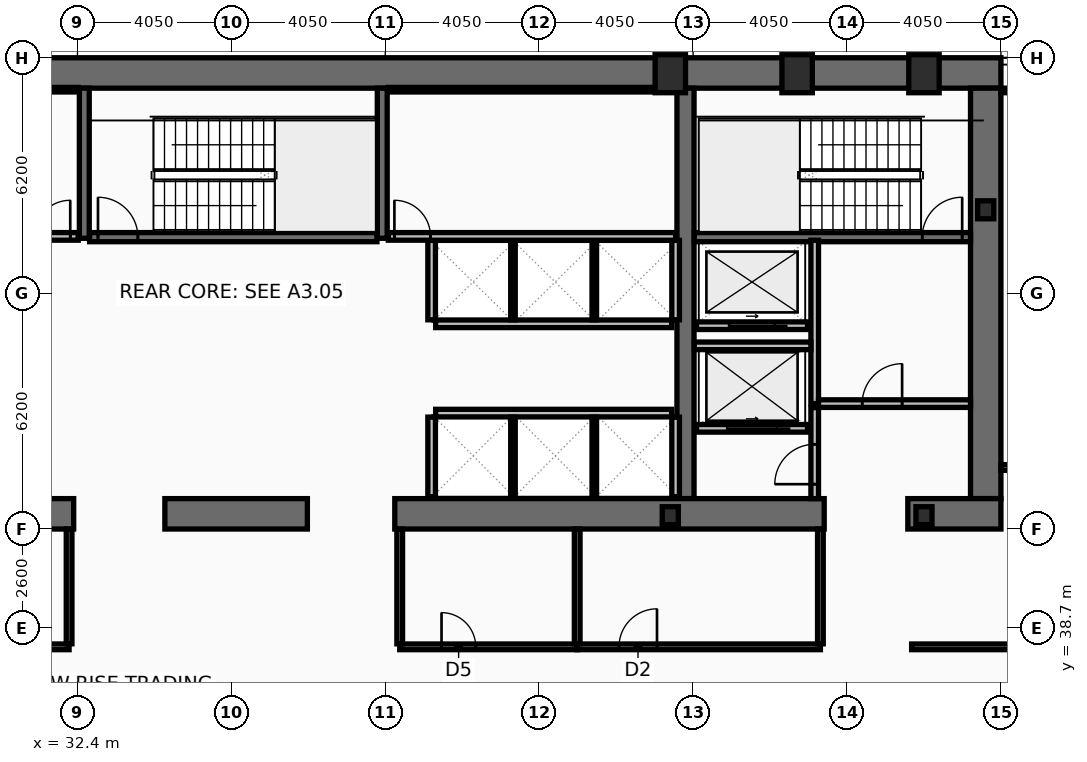
"""IFC4 building model, lengths in metres.
Left out: names, types, materials, properties, quantities, classifications, styles, units other than length and angle.
Written with IfcOpenShell. Run it as: python <this file> out.ifc"""

import sys

from ifc_helpers import new_model, si_unit, direction, frame, frame_2d, origin, origin_2d, place, context, subcontext, project, spatial, rectangle, hollow_rectangle, i_section, extrude, element, fill, save


model = new_model("IFC4")
c1 = context("Model", 3, precision=1e-05, world=origin(), true_north=direction((0.0, 1.0)))
c2 = subcontext(c1, "Body", "Model", "MODEL_VIEW")
j1 = project(units=[si_unit("LENGTHUNIT", "METRE"), si_unit("PLANEANGLEUNIT", "RADIAN")], contexts=[c1])
p1 = place(None, origin())
s1 = spatial("IfcSite", under=j1, at=p1, CompositionType="ELEMENT")
p2 = place(p1, origin())
s2 = spatial("IfcBuilding", under=s1, at=p2, CompositionType="ELEMENT")
p3 = place(p2, frame((0.0, 0.0, 77.8)))
s3 = spatial("IfcBuildingStorey", under=s2, at=p3, CompositionType="ELEMENT", Elevation=77.8)
p4 = place(p3, frame((16.2, 53.3, 0.0), z_axis=(0.0, 0.0, 1.0), x_axis=(1.0, 0.0, 0.0)))
e1 = element("IfcWall", 1, at=p4, inside=s3, PredefinedType="SHEAR", context=c2, shape_type="SweptSolid", body=[
    extrude(rectangle(XDim=40.5, YDim=0.8, at=frame_2d((20.25, 0.0))), origin(), (0.0, 0.0, 1.0), 3.82),
])
p5 = place(p3, frame((56.3, 52.9, 0.0), z_axis=(0.0, 0.0, 1.0), x_axis=(0.0, -1.0, 0.0)))
e2 = element("IfcWall", 2, at=p5, inside=s3, PredefinedType="SHEAR", context=c2, shape_type="SweptSolid", body=[
    extrude(rectangle(XDim=10.8, YDim=0.8, at=frame_2d((5.4, 0.0))), origin(), (0.0, 0.0, 1.0), 3.82),
])
p6 = place(p3, frame((48.4, 42.1, 0.0), z_axis=(0.0, 0.0, 1.0), x_axis=(0.0, 1.0, 0.0)))
e3 = element("IfcWall", 3, at=p6, inside=s3, PredefinedType="SHEAR", context=c2, shape_type="SweptSolid", body=[
    extrude(rectangle(XDim=10.8, YDim=0.45, at=frame_2d((5.4, 0.0))), origin(), (0.0, 0.0, 1.0), 3.82),
])
p7 = place(p3, frame((32.3, 41.7, 0.0), z_axis=(0.0, 0.0, 1.0), x_axis=(-1.0, 0.0, 0.0)))
e4 = element("IfcWall", 4, at=p7, inside=s3, PredefinedType="SHEAR", context=c2, shape_type="SweptSolid", body=[
    extrude(rectangle(XDim=11.45, YDim=0.8, at=frame_2d((5.725, 0.0))), origin(), (0.0, 0.0, 1.0), 3.82),
])
p8 = place(p3, frame((38.45, 41.7, 0.0), z_axis=(0.0, 0.0, 1.0), x_axis=(-1.0, 0.0, 0.0)))
e5 = element("IfcWall", 5, at=p8, inside=s3, PredefinedType="SHEAR", context=c2, shape_type="SweptSolid", body=[
    extrude(rectangle(XDim=3.75, YDim=0.8, at=frame_2d((1.875, 0.0))), origin(), (0.0, 0.0, 1.0), 3.82),
])
p9 = place(p3, frame((52.05, 41.7, 0.0), z_axis=(0.0, 0.0, 1.0), x_axis=(-1.0, 0.0, 0.0)))
e6 = element("IfcWall", 6, at=p9, inside=s3, PredefinedType="SHEAR", context=c2, shape_type="SweptSolid", body=[
    extrude(rectangle(XDim=11.3, YDim=0.8, at=frame_2d((5.65, 0.0))), origin(), (0.0, 0.0, 1.0), 3.82),
])
p10 = place(p3, frame((56.7, 41.7, 0.0), z_axis=(0.0, 0.0, 1.0), x_axis=(-1.0, 0.0, 0.0)))
e7 = element("IfcWall", 7, at=p10, inside=s3, PredefinedType="SHEAR", context=c2, shape_type="SweptSolid", body=[
    extrude(rectangle(XDim=2.45, YDim=0.8, at=frame_2d((1.225, 0.0))), origin(), (0.0, 0.0, 1.0), 3.82),
])
for number, where, z_axis, x_axis in (
    (8, (32.58, 48.95, 0.0), (0.0, 0.0, 1.0), (0.0, 1.0, 0.0)),
    (9, (40.42, 48.95, 0.0), (0.0, 0.0, 1.0), (0.0, 1.0, 0.0)),
):
    element("IfcWall", number, at=place(p3, frame(where, z_axis=z_axis, x_axis=x_axis)), inside=s3, PredefinedType="SHEAR", context=c2, shape_type="SweptSolid", body=[
        extrude(rectangle(XDim=3.95, YDim=0.26, at=frame_2d((1.975, 0.0))), origin(), (0.0, 0.0, 1.0), 3.82),
    ])
p11 = place(p3, frame((48.63, 48.98, 0.0), z_axis=(0.0, 0.0, 1.0), x_axis=(1.0, 0.0, 0.0)))
e10 = element("IfcWall", 10, at=p11, inside=s3, PredefinedType="SHEAR", context=c2, shape_type="SweptSolid", body=[
    extrude(rectangle(XDim=7.27, YDim=0.24, at=frame_2d((3.635, 0.0))), origin(), (0.0, 0.0, 1.0), 3.82),
])
p12 = place(p11, frame((6.0, 0.0, 0.0)))
e11 = element("IfcOpeningElement", 11, at=p12, cuts=e10, PredefinedType="OPENING", context=c2, shape_type="SweptSolid", body=[
    extrude(rectangle(XDim=1.05, YDim=2.15, at=frame_2d((0.525, 1.075))), frame((0.0, 0.13, 0.0), z_axis=(0.0, -1.0, 0.0), x_axis=(1.0, 0.0, 0.0)), (0.0, 0.0, 1.0), 0.26),
])
p13 = place(p3, frame((32.72, 48.98, 0.0), z_axis=(0.0, 0.0, 1.0), x_axis=(1.0, 0.0, 0.0)))
e12 = element("IfcWall", 12, at=p13, inside=s3, PredefinedType="SHEAR", context=c2, shape_type="SweptSolid", body=[
    extrude(rectangle(XDim=7.56, YDim=0.24, at=frame_2d((3.78, 0.0))), origin(), (0.0, 0.0, 1.0), 3.82),
])
p14 = place(p13, frame((0.22, 0.0, 0.0)))
e13 = element("IfcOpeningElement", 13, at=p14, cuts=e12, PredefinedType="OPENING", context=c2, shape_type="SweptSolid", body=[
    extrude(rectangle(XDim=1.05, YDim=2.15, at=frame_2d((0.525, 1.075))), frame((0.0, 0.13, 0.0), z_axis=(0.0, -1.0, 0.0), x_axis=(1.0, 0.0, 0.0)), (0.0, 0.0, 1.0), 0.26),
])
for number, where, z_axis, x_axis in (
    (14, (48.0, 53.28, 0.0), (0.0, 0.0, 1.0), (1.0, 0.0, 0.0)),
    (15, (51.337, 53.28, 0.0), (0.0, 0.0, 1.0), (1.0, 0.0, 0.0)),
    (16, (54.675, 53.28, 0.0), (0.0, 0.0, 1.0), (1.0, 0.0, 0.0)),
):
    element("IfcColumn", number, at=place(p3, frame(where, z_axis=z_axis, x_axis=x_axis)), inside=s3, PredefinedType="COLUMN", context=c2, shape_type="SweptSolid", body=[
        extrude(hollow_rectangle(XDim=0.8, YDim=1.0, WallThickness=0.055, at=origin_2d()), origin(), (0.0, 0.0, 1.0), 4.0),
    ])
for number, where, z_axis, x_axis in (
    (17, (56.3, 49.7, 0.0), (0.0, 0.0, 1.0), (1.0, 0.0, 0.0)),
    (18, (48.0, 41.65, 0.0), (0.0, 0.0, 1.0), (1.0, 0.0, 0.0)),
    (19, (54.675, 41.65, 0.0), (0.0, 0.0, 1.0), (1.0, 0.0, 0.0)),
):
    element("IfcColumn", number, at=place(p3, frame(where, z_axis=z_axis, x_axis=x_axis)), inside=s3, PredefinedType="COLUMN", context=c2, shape_type="SweptSolid", body=[
        extrude(i_section(OverallWidth=0.424, OverallDepth=0.474, WebThickness=0.048, FlangeThickness=0.077, at=origin_2d()), origin(), (0.0, 0.0, 1.0), 4.0),
    ])
p15 = place(p3, frame((51.61, 43.95, 0.0), z_axis=(0.0, 0.0, 1.0), x_axis=(-1.0, 0.0, 0.0)))
e20 = element("IfcWall", 20, at=p15, inside=s3, PredefinedType="PARTITIONING", context=c2, shape_type="SweptSolid", body=[
    extrude(rectangle(XDim=2.92, YDim=0.2, at=frame_2d((1.46, 0.0))), origin(), (0.0, 0.0, 1.0), 3.82),
])
p16 = place(p15, frame((0.81, 0.0, 0.0)))
e21 = element("IfcOpeningElement", 21, at=p16, cuts=e20, PredefinedType="OPENING", context=c2, shape_type="SweptSolid", body=[
    extrude(rectangle(XDim=1.3, YDim=2.18, at=frame_2d((0.65, 1.09))), frame((0.0, 0.11, 0.0), z_axis=(0.0, -1.0, 0.0), x_axis=(1.0, 0.0, 0.0)), (0.0, 0.0, 1.0), 0.22),
])
p17 = place(p3, frame((51.61, 46.65, 0.0), z_axis=(0.0, 0.0, 1.0), x_axis=(-1.0, 0.0, 0.0)))
e22 = element("IfcWall", 22, at=p17, inside=s3, PredefinedType="PARTITIONING", context=c2, shape_type="SweptSolid", body=[
    extrude(rectangle(XDim=2.92, YDim=0.2, at=frame_2d((1.46, 0.0))), origin(), (0.0, 0.0, 1.0), 3.82),
])
p18 = place(p17, frame((0.86, 0.0, 0.0)))
e23 = element("IfcOpeningElement", 23, at=p18, cuts=e22, PredefinedType="OPENING", context=c2, shape_type="SweptSolid", body=[
    extrude(rectangle(XDim=1.2, YDim=2.18, at=frame_2d((0.6, 1.09))), frame((0.0, 0.11, 0.0), z_axis=(0.0, -1.0, 0.0), x_axis=(1.0, 0.0, 0.0)), (0.0, 0.0, 1.0), 0.22),
])
p19 = place(p3, frame((51.8, 44.6, 0.0), z_axis=(0.0, 0.0, 1.0), x_axis=(0.0, 1.0, 0.0)))
e24 = element("IfcWall", 24, at=p19, inside=s3, PredefinedType="PARTITIONING", context=c2, shape_type="SweptSolid", body=[
    extrude(rectangle(XDim=4.3, YDim=0.2, at=frame_2d((2.15, 0.0))), origin(), (0.0, 0.0, 1.0), 3.82),
])
p20 = place(p3, frame((51.9, 44.6, 0.0), z_axis=(0.0, 0.0, 1.0), x_axis=(1.0, 0.0, 0.0)))
e25 = element("IfcWall", 25, at=p20, inside=s3, PredefinedType="PARTITIONING", context=c2, shape_type="SweptSolid", body=[
    extrude(rectangle(XDim=4.0, YDim=0.2, at=frame_2d((2.0, 0.0))), origin(), (0.0, 0.0, 1.0), 3.82),
])
p21 = place(p20, frame((1.15, 0.0, 0.0)))
e26 = element("IfcOpeningElement", 26, at=p21, cuts=e25, PredefinedType="OPENING", context=c2, shape_type="SweptSolid", body=[
    extrude(rectangle(XDim=1.05, YDim=2.15, at=frame_2d((0.525, 1.075))), frame((0.0, 0.11, 0.0), z_axis=(0.0, -1.0, 0.0), x_axis=(1.0, 0.0, 0.0)), (0.0, 0.0, 1.0), 0.22),
])
p22 = place(p3, frame((48.63, 46.12, 0.0), z_axis=(0.0, 0.0, 1.0), x_axis=(1.0, 0.0, 0.0)))
e27 = element("IfcWall", 27, at=p22, inside=s3, PredefinedType="PARTITIONING", context=c2, shape_type="SweptSolid", body=[
    extrude(rectangle(XDim=3.07, YDim=0.2, at=frame_2d((1.535, 0.0))), origin(), (0.0, 0.0, 1.0), 3.82),
])
p23 = place(p3, frame((51.8, 42.1, 0.0), z_axis=(0.0, 0.0, 1.0), x_axis=(0.0, 1.0, 0.0)))
e28 = element("IfcWall", 28, at=p23, inside=s3, PredefinedType="PARTITIONING", context=c2, shape_type="SweptSolid", body=[
    extrude(rectangle(XDim=2.395, YDim=0.2, at=frame_2d((1.198, 0.0))), origin(), (0.0, 0.0, 1.0), 3.82),
])
p24 = place(p23, frame((0.38, 0.0, 0.0)))
e29 = element("IfcOpeningElement", 29, at=p24, cuts=e28, PredefinedType="OPENING", context=c2, shape_type="SweptSolid", body=[
    extrude(rectangle(XDim=1.05, YDim=2.15, at=frame_2d((0.525, 1.075))), frame((0.0, 0.11, 0.0), z_axis=(0.0, -1.0, 0.0), x_axis=(1.0, 0.0, 0.0)), (0.0, 0.0, 1.0), 0.22),
])
p25 = place(p3, frame((41.825, 46.7, 0.0), z_axis=(0.0, 0.0, 1.0), x_axis=(1.0, 0.0, 0.0)))
e30 = element("IfcWall", 30, at=p25, inside=s3, PredefinedType="PARTITIONING", context=c2, shape_type="SweptSolid", body=[
    extrude(rectangle(XDim=6.21, YDim=0.2, at=frame_2d((3.105, 0.0))), origin(), (0.0, 0.0, 1.0), 3.82),
])
for number, where, z_axis, x_axis in (
    (31, (41.72, 46.805, 0.0), (0.0, 0.0, 1.0), (0.0, 1.0, 0.0)),
    (32, (48.14, 46.805, 0.0), (0.0, 0.0, 1.0), (0.0, 1.0, 0.0)),
):
    element("IfcWall", number, at=place(p3, frame(where, z_axis=z_axis, x_axis=x_axis)), inside=s3, PredefinedType="PARTITIONING", context=c2, shape_type="SweptSolid", body=[
        extrude(rectangle(XDim=2.09, YDim=0.2, at=frame_2d((1.045, 0.0))), origin(), (0.0, 0.0, 1.0), 3.82),
    ])
for number, where, z_axis, x_axis in (
    (33, (43.86, 46.805, 0.0), (0.0, 0.0, 1.0), (0.0, 1.0, 0.0)),
    (34, (46.0, 46.805, 0.0), (0.0, 0.0, 1.0), (0.0, 1.0, 0.0)),
):
    element("IfcWall", number, at=place(p3, frame(where, z_axis=z_axis, x_axis=x_axis)), inside=s3, PredefinedType="PARTITIONING", context=c2, shape_type="SweptSolid", body=[
        extrude(rectangle(XDim=2.09, YDim=0.12, at=frame_2d((1.045, 0.0))), origin(), (0.0, 0.0, 1.0), 3.82),
    ])
p26 = place(p3, frame((41.825, 44.35, 0.0), z_axis=(0.0, 0.0, 1.0), x_axis=(1.0, 0.0, 0.0)))
e35 = element("IfcWall", 35, at=p26, inside=s3, PredefinedType="PARTITIONING", context=c2, shape_type="SweptSolid", body=[
    extrude(rectangle(XDim=6.21, YDim=0.2, at=frame_2d((3.105, 0.0))), origin(), (0.0, 0.0, 1.0), 3.82),
])
for number, where, z_axis, x_axis in (
    (36, (41.72, 42.15, 0.0), (0.0, 0.0, 1.0), (0.0, 1.0, 0.0)),
    (37, (48.14, 42.15, 0.0), (0.0, 0.0, 1.0), (0.0, 1.0, 0.0)),
):
    element("IfcWall", number, at=place(p3, frame(where, z_axis=z_axis, x_axis=x_axis)), inside=s3, PredefinedType="PARTITIONING", context=c2, shape_type="SweptSolid", body=[
        extrude(rectangle(XDim=2.095, YDim=0.2, at=frame_2d((1.048, 0.0))), origin(), (0.0, 0.0, 1.0), 3.82),
    ])
for number, where, z_axis, x_axis in (
    (38, (43.86, 42.15, 0.0), (0.0, 0.0, 1.0), (0.0, 1.0, 0.0)),
    (39, (46.0, 42.15, 0.0), (0.0, 0.0, 1.0), (0.0, 1.0, 0.0)),
):
    element("IfcWall", number, at=place(p3, frame(where, z_axis=z_axis, x_axis=x_axis)), inside=s3, PredefinedType="PARTITIONING", context=c2, shape_type="SweptSolid", body=[
        extrude(rectangle(XDim=2.095, YDim=0.12, at=frame_2d((1.048, 0.0))), origin(), (0.0, 0.0, 1.0), 3.82),
    ])
p27 = place(p3, frame((24.7, 52.86, 0.0), z_axis=(0.0, 0.0, 1.0), x_axis=(1.0, 0.0, 0.0)))
e40 = element("IfcWall", 40, at=p27, inside=s3, PredefinedType="PARTITIONING", context=c2, shape_type="SweptSolid", body=[
    extrude(rectangle(XDim=7.72, YDim=0.12, at=frame_2d((3.86, 0.0))), origin(), (0.0, 0.0, 1.0), 3.82),
])
p28 = place(p3, frame((24.7, 49.0, 0.0), z_axis=(0.0, 0.0, 1.0), x_axis=(1.0, 0.0, 0.0)))
e41 = element("IfcWall", 41, at=p28, inside=s3, PredefinedType="PARTITIONING", context=c2, shape_type="SweptSolid", body=[
    extrude(rectangle(XDim=7.72, YDim=0.2, at=frame_2d((3.86, 0.0))), origin(), (0.0, 0.0, 1.0), 3.82),
])
p29 = place(p28, frame((6.56, 0.0, 0.0)))
e42 = element("IfcOpeningElement", 42, at=p29, cuts=e41, PredefinedType="OPENING", context=c2, shape_type="SweptSolid", body=[
    extrude(rectangle(XDim=0.95, YDim=2.1, at=frame_2d((0.475, 1.05))), frame((0.0, 0.11, 0.0), z_axis=(0.0, -1.0, 0.0), x_axis=(1.0, 0.0, 0.0)), (0.0, 0.0, 1.0), 0.22),
])
p30 = place(p3, frame((40.58, 52.86, 0.0), z_axis=(0.0, 0.0, 1.0), x_axis=(1.0, 0.0, 0.0)))
e43 = element("IfcWall", 43, at=p30, inside=s3, PredefinedType="PARTITIONING", context=c2, shape_type="SweptSolid", body=[
    extrude(rectangle(XDim=7.56, YDim=0.12, at=frame_2d((3.78, 0.0))), origin(), (0.0, 0.0, 1.0), 3.82),
])
p31 = place(p3, frame((40.58, 49.0, 0.0), z_axis=(0.0, 0.0, 1.0), x_axis=(1.0, 0.0, 0.0)))
e44 = element("IfcWall", 44, at=p31, inside=s3, PredefinedType="PARTITIONING", context=c2, shape_type="SweptSolid", body=[
    extrude(rectangle(XDim=7.56, YDim=0.2, at=frame_2d((3.78, 0.0))), origin(), (0.0, 0.0, 1.0), 3.82),
])
p32 = place(p31, frame((0.16, 0.0, 0.0)))
e45 = element("IfcOpeningElement", 45, at=p32, cuts=e44, PredefinedType="OPENING", context=c2, shape_type="SweptSolid", body=[
    extrude(rectangle(XDim=0.95, YDim=2.1, at=frame_2d((0.475, 1.05))), frame((0.0, 0.11, 0.0), z_axis=(0.0, -1.0, 0.0), x_axis=(1.0, 0.0, 0.0)), (0.0, 0.0, 1.0), 0.22),
])
p33 = place(p3, frame((28.4, 38.2, 0.0), z_axis=(0.0, 0.0, 1.0), x_axis=(1.0, 0.0, 0.0)))
e46 = element("IfcWall", 46, at=p33, inside=s3, PredefinedType="PARTITIONING", context=c2, shape_type="SweptSolid", body=[
    extrude(rectangle(XDim=3.78, YDim=0.15, at=frame_2d((1.89, 0.0))), origin(), (0.0, 0.0, 1.0), 3.01),
])
p34 = place(p33, frame((0.7, 0.0, 0.0)))
e47 = element("IfcOpeningElement", 47, at=p34, cuts=e46, PredefinedType="OPENING", context=c2, shape_type="SweptSolid", body=[
    extrude(rectangle(XDim=0.95, YDim=2.05, at=frame_2d((0.475, 1.025))), frame((0.0, 0.085, 0.0), z_axis=(0.0, -1.0, 0.0), x_axis=(1.0, 0.0, 0.0)), (0.0, 0.0, 1.0), 0.17),
])
p35 = place(p3, frame((32.18, 38.28, 0.0), z_axis=(0.0, 0.0, 1.0), x_axis=(0.0, 1.0, 0.0)))
e48 = element("IfcWall", 48, at=p35, inside=s3, PredefinedType="PARTITIONING", context=c2, shape_type="SweptSolid", body=[
    extrude(rectangle(XDim=3.02, YDim=0.15, at=frame_2d((1.51, 0.0))), origin(), (0.0, 0.0, 1.0), 3.82),
])
p36 = place(p3, frame((40.88, 38.2, 0.0), z_axis=(0.0, 0.0, 1.0), x_axis=(1.0, 0.0, 0.0)))
e49 = element("IfcWall", 49, at=p36, inside=s3, PredefinedType="PARTITIONING", context=c2, shape_type="SweptSolid", body=[
    extrude(rectangle(XDim=4.67, YDim=0.15, at=frame_2d((2.335, 0.0))), origin(), (0.0, 0.0, 1.0), 3.01),
])
p37 = place(p36, frame((1.1, 0.0, 0.0)))
e50 = element("IfcOpeningElement", 50, at=p37, cuts=e49, PredefinedType="OPENING", context=c2, shape_type="SweptSolid", body=[
    extrude(rectangle(XDim=0.9, YDim=2.05, at=frame_2d((0.45, 1.025))), frame((0.0, 0.085, 0.0), z_axis=(0.0, -1.0, 0.0), x_axis=(1.0, 0.0, 0.0)), (0.0, 0.0, 1.0), 0.17),
])
p38 = place(p3, frame((45.55, 38.2, 0.0), z_axis=(0.0, 0.0, 1.0), x_axis=(1.0, 0.0, 0.0)))
e51 = element("IfcWall", 51, at=p38, inside=s3, PredefinedType="PARTITIONING", context=c2, shape_type="SweptSolid", body=[
    extrude(rectangle(XDim=6.4, YDim=0.15, at=frame_2d((3.2, 0.0))), origin(), (0.0, 0.0, 1.0), 3.01),
])
p39 = place(p38, frame((1.1, 0.0, 0.0)))
e52 = element("IfcOpeningElement", 52, at=p39, cuts=e51, PredefinedType="OPENING", context=c2, shape_type="SweptSolid", body=[
    extrude(rectangle(XDim=1.0, YDim=2.05, at=frame_2d((0.5, 1.025))), frame((0.0, 0.085, 0.0), z_axis=(0.0, -1.0, 0.0), x_axis=(1.0, 0.0, 0.0)), (0.0, 0.0, 1.0), 0.17),
])
for number, where, z_axis, x_axis in (
    (53, (40.88, 38.28, 0.0), (0.0, 0.0, 1.0), (0.0, 1.0, 0.0)),
    (54, (45.55, 38.28, 0.0), (0.0, 0.0, 1.0), (0.0, 1.0, 0.0)),
    (55, (51.95, 38.28, 0.0), (0.0, 0.0, 1.0), (0.0, 1.0, 0.0)),
):
    element("IfcWall", number, at=place(p3, frame(where, z_axis=z_axis, x_axis=x_axis)), inside=s3, PredefinedType="PARTITIONING", context=c2, shape_type="SweptSolid", body=[
        extrude(rectangle(XDim=3.02, YDim=0.15, at=frame_2d((1.51, 0.0))), origin(), (0.0, 0.0, 1.0), 3.82),
    ])
p40 = place(p3, frame((54.35, 38.2, 0.0), z_axis=(0.0, 0.0, 1.0), x_axis=(1.0, 0.0, 0.0)))
e56 = element("IfcWall", 56, at=p40, inside=s3, PredefinedType="PARTITIONING", context=c2, shape_type="SweptSolid", body=[
    extrude(rectangle(XDim=16.52, YDim=0.15, at=frame_2d((8.26, 0.0))), origin(), (0.0, 0.0, 1.0), 3.01),
])
p41 = place(p40, frame((3.25, 0.0, 0.0)))
e57 = element("IfcOpeningElement", 57, at=p41, cuts=e56, PredefinedType="OPENING", context=c2, shape_type="SweptSolid", body=[
    extrude(rectangle(XDim=0.95, YDim=2.05, at=frame_2d((0.475, 1.025))), frame((0.0, 0.085, 0.0), z_axis=(0.0, -1.0, 0.0), x_axis=(1.0, 0.0, 0.0)), (0.0, 0.0, 1.0), 0.17),
])
p42 = place(p3, frame((56.7, 42.92, 0.0), z_axis=(0.0, 0.0, 1.0), x_axis=(1.0, 0.0, 0.0)))
e58 = element("IfcWall", 58, at=p42, inside=s3, PredefinedType="PARTITIONING", context=c2, shape_type="SweptSolid", body=[
    extrude(rectangle(XDim=14.105, YDim=0.15, at=frame_2d((7.052, 0.0))), origin(), (0.0, 0.0, 1.0), 2.47),
])
p43 = place(p42, frame((0.9, 0.0, 0.0)))
e59 = element("IfcOpeningElement", 59, at=p43, cuts=e58, PredefinedType="OPENING", context=c2, shape_type="SweptSolid", body=[
    extrude(rectangle(XDim=0.9, YDim=2.05, at=frame_2d((0.45, 1.025))), frame((0.0, 0.085, 0.0), z_axis=(0.0, -1.0, 0.0), x_axis=(1.0, 0.0, 0.0)), (0.0, 0.0, 1.0), 0.17),
])
p44 = place(p3, frame((56.7, 52.84, 0.0), z_axis=(0.0, 0.0, 1.0), x_axis=(1.0, 0.0, 0.0)))
e60 = element("IfcWall", 60, at=p44, inside=s3, PredefinedType="PARTITIONING", context=c2, shape_type="SweptSolid", body=[
    extrude(rectangle(XDim=14.105, YDim=0.12, at=frame_2d((7.052, 0.0))), origin(), (0.0, 0.0, 1.0), 3.82),
])
p45 = place(p12, origin())
e61 = element("IfcDoor", 61, at=p45, inside=s3, OperationType="SINGLE_SWING_RIGHT", PredefinedType="DOOR", context=c2, shape_type="SweptSolid", body=[
    extrude(rectangle(XDim=1.05, YDim=2.15, at=frame_2d((0.525, 1.075))), frame((0.0, 0.025, 0.0), z_axis=(0.0, -1.0, 0.0), x_axis=(1.0, 0.0, 0.0)), (0.0, 0.0, 1.0), 0.05),
])
fill(e11, e61)
p46 = place(p14, origin())
e62 = element("IfcDoor", 62, at=p46, inside=s3, OperationType="SINGLE_SWING_LEFT", PredefinedType="DOOR", context=c2, shape_type="SweptSolid", body=[
    extrude(rectangle(XDim=1.05, YDim=2.15, at=frame_2d((0.525, 1.075))), frame((0.0, 0.025, 0.0), z_axis=(0.0, -1.0, 0.0), x_axis=(1.0, 0.0, 0.0)), (0.0, 0.0, 1.0), 0.05),
])
fill(e13, e62)
p47 = place(p16, origin())
e63 = element("IfcDoor", 63, at=p47, inside=s3, OperationType="SLIDING_TO_LEFT", PredefinedType="DOOR", context=c2, shape_type="SweptSolid", body=[
    extrude(rectangle(XDim=1.3, YDim=2.18, at=frame_2d((0.65, 1.09))), frame((0.0, 0.025, 0.0), z_axis=(0.0, -1.0, 0.0), x_axis=(1.0, 0.0, 0.0)), (0.0, 0.0, 1.0), 0.05),
])
fill(e21, e63)
p48 = place(p18, origin())
e64 = element("IfcDoor", 64, at=p48, inside=s3, OperationType="SLIDING_TO_LEFT", PredefinedType="DOOR", context=c2, shape_type="SweptSolid", body=[
    extrude(rectangle(XDim=1.2, YDim=2.18, at=frame_2d((0.6, 1.09))), frame((0.0, 0.025, 0.0), z_axis=(0.0, -1.0, 0.0), x_axis=(1.0, 0.0, 0.0)), (0.0, 0.0, 1.0), 0.05),
])
fill(e23, e64)
p49 = place(p21, origin())
e65 = element("IfcDoor", 65, at=p49, inside=s3, OperationType="SINGLE_SWING_RIGHT", PredefinedType="DOOR", context=c2, shape_type="SweptSolid", body=[
    extrude(rectangle(XDim=1.05, YDim=2.15, at=frame_2d((0.525, 1.075))), frame((0.0, 0.025, 0.0), z_axis=(0.0, -1.0, 0.0), x_axis=(1.0, 0.0, 0.0)), (0.0, 0.0, 1.0), 0.05),
])
fill(e26, e65)
p50 = place(p24, origin())
e66 = element("IfcDoor", 66, at=p50, inside=s3, OperationType="SINGLE_SWING_LEFT", PredefinedType="DOOR", context=c2, shape_type="SweptSolid", body=[
    extrude(rectangle(XDim=1.05, YDim=2.15, at=frame_2d((0.525, 1.075))), frame((0.0, 0.025, 0.0), z_axis=(0.0, -1.0, 0.0), x_axis=(1.0, 0.0, 0.0)), (0.0, 0.0, 1.0), 0.05),
])
fill(e29, e66)
p51 = place(p29, origin())
e67 = element("IfcDoor", 67, at=p51, inside=s3, OperationType="SINGLE_SWING_RIGHT", PredefinedType="DOOR", context=c2, shape_type="SweptSolid", body=[
    extrude(rectangle(XDim=0.95, YDim=2.1, at=frame_2d((0.475, 1.05))), frame((0.0, 0.025, 0.0), z_axis=(0.0, -1.0, 0.0), x_axis=(1.0, 0.0, 0.0)), (0.0, 0.0, 1.0), 0.05),
])
fill(e42, e67)
p52 = place(p32, origin())
e68 = element("IfcDoor", 68, at=p52, inside=s3, OperationType="SINGLE_SWING_LEFT", PredefinedType="DOOR", context=c2, shape_type="SweptSolid", body=[
    extrude(rectangle(XDim=0.95, YDim=2.1, at=frame_2d((0.475, 1.05))), frame((0.0, 0.025, 0.0), z_axis=(0.0, -1.0, 0.0), x_axis=(1.0, 0.0, 0.0)), (0.0, 0.0, 1.0), 0.05),
])
fill(e45, e68)
p53 = place(p37, origin())
e69 = element("IfcDoor", 69, at=p53, inside=s3, OperationType="SINGLE_SWING_LEFT", PredefinedType="DOOR", context=c2, shape_type="SweptSolid", body=[
    extrude(rectangle(XDim=0.9, YDim=2.05, at=frame_2d((0.45, 1.025))), frame((0.0, 0.025, 0.0), z_axis=(0.0, -1.0, 0.0), x_axis=(1.0, 0.0, 0.0)), (0.0, 0.0, 1.0), 0.05),
])
fill(e50, e69)
p54 = place(p39, origin())
e70 = element("IfcDoor", 70, at=p54, inside=s3, OperationType="SINGLE_SWING_RIGHT", PredefinedType="DOOR", context=c2, shape_type="SweptSolid", body=[
    extrude(rectangle(XDim=1.0, YDim=2.05, at=frame_2d((0.5, 1.025))), frame((0.0, 0.025, 0.0), z_axis=(0.0, -1.0, 0.0), x_axis=(1.0, 0.0, 0.0)), (0.0, 0.0, 1.0), 0.05),
])
fill(e52, e70)
save(model, sys.argv[1])
